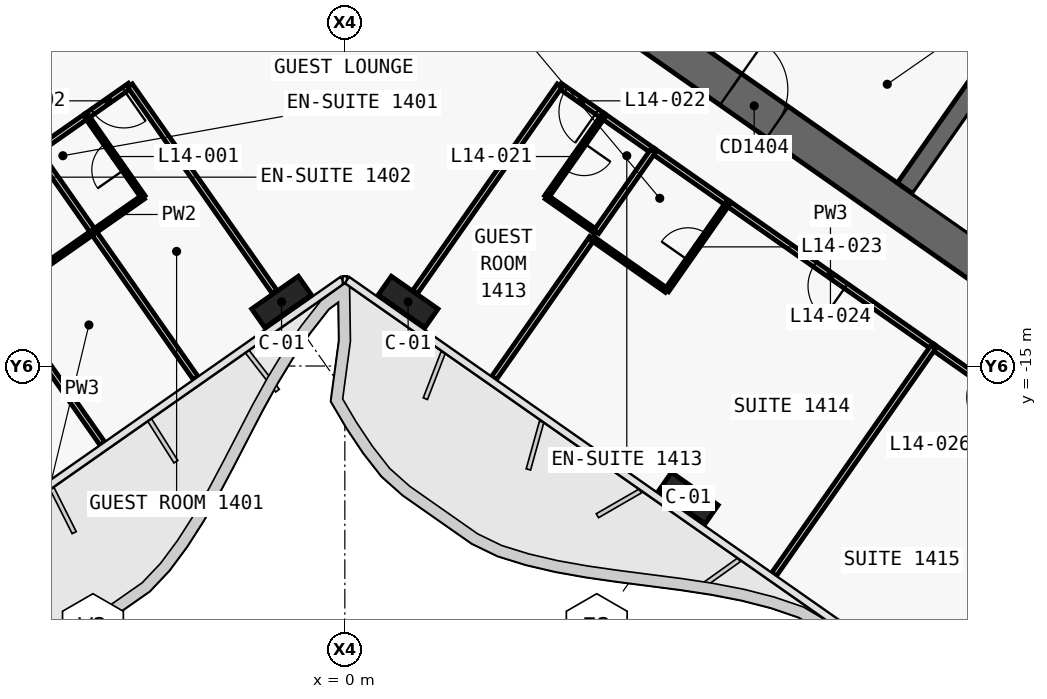
"""IFC4 building model, lengths in metres.
Left out: names, types, materials, properties, quantities, classifications, styles, units other than length and angle.
Written with IfcOpenShell. Run it as: python <this file> out.ifc"""

import sys

from ifc_helpers import new_model, si_unit, direction, frame, frame_2d, origin, origin_2d, place, context, subcontext, project, spatial, polyline, rectangle, outline, extrude, element, fill, save


model = new_model("IFC4")
c1 = context("Model", 3, precision=1e-05, world=origin(), true_north=direction((0.0, 1.0)))
c2 = subcontext(c1, "Body", "Model", "MODEL_VIEW")
j1 = project(units=[si_unit("LENGTHUNIT", "METRE"), si_unit("PLANEANGLEUNIT", "RADIAN")], contexts=[c1])
p1 = place(None, origin())
s1 = spatial("IfcSite", under=j1, at=p1, CompositionType="ELEMENT")
p2 = place(p1, origin())
s2 = spatial("IfcBuilding", under=s1, at=p2, CompositionType="ELEMENT")
p3 = place(p2, frame((0.0, 0.0, 76.1)))
s3 = spatial("IfcBuildingStorey", under=s2, at=p3, CompositionType="ELEMENT", Elevation=76.1)
p4 = place(p3, frame((0.037, 11.867, 0.0), z_axis=(0.0, 0.0, 1.0), x_axis=(-0.819155306259, -0.573571777746, 0.0)))
e1 = element("IfcWall", 1, at=p4, inside=s3, PredefinedType="SHEAR", context=c2, shape_type="SweptSolid", body=[
    extrude(outline(polyline([(33.837, 0.5), (0.7, 0.5), (0.0, -0.5), (33.837, -0.5), (33.837, 0.5)])), origin(), (0.0, 0.0, 1.0), 3.6),
])
p5 = place(p3, frame((0.037, -0.585, 0.0), z_axis=(0.0, 0.0, 1.0), x_axis=(-0.819157152511, -0.573569140985, 0.0)))
e2 = element("IfcWall", 2, at=p5, inside=s3, PredefinedType="SHEAR", context=c2, shape_type="SweptSolid", body=[
    extrude(outline(polyline([(26.695, 0.5), (0.7, 0.5), (0.0, -0.5), (26.695, -0.5), (26.695, 0.5)])), origin(), (0.0, 0.0, 1.0), 3.6),
])
p6 = place(p5, frame((2.995, 0.0, 0.0)))
e3 = element("IfcOpeningElement", 3, at=p6, cuts=e2, PredefinedType="OPENING", context=c2, shape_type="SweptSolid", body=[
    extrude(rectangle(XDim=2.4, YDim=2.1, at=frame_2d((1.2, 1.05))), frame((0.0, 0.51, 0.0), z_axis=(0.0, -1.0, 0.0), x_axis=(1.0, 0.0, 0.0)), (0.0, 0.0, 1.0), 1.02),
])
p7 = place(p5, frame((11.995, 0.0, 0.0)))
e4 = element("IfcOpeningElement", 4, at=p7, cuts=e2, PredefinedType="OPENING", context=c2, shape_type="SweptSolid", body=[
    extrude(rectangle(XDim=2.4, YDim=2.1, at=frame_2d((1.2, 1.05))), frame((0.0, 0.51, 0.0), z_axis=(0.0, -1.0, 0.0), x_axis=(1.0, 0.0, 0.0)), (0.0, 0.0, 1.0), 1.02),
])
p8 = place(p3, frame((-2.638, 3.768, 0.0), z_axis=(0.0, 0.0, 1.0), x_axis=(-0.819148977158, -0.573580816643, 0.0)))
e5 = element("IfcWall", 5, at=p8, inside=s3, PredefinedType="SHEAR", context=c2, shape_type="SweptSolid", body=[
    extrude(outline(polyline([(26.0, 0.25), (0.0, 0.25), (0.0, -0.25), (26.0, -0.25), (26.0, 0.25)])), origin(), (0.0, 0.0, 1.0), 3.6),
])
p9 = place(p8, frame((1.169, 0.0, 0.0)))
e6 = element("IfcOpeningElement", 6, at=p9, cuts=e5, PredefinedType="OPENING", context=c2, shape_type="SweptSolid", body=[
    extrude(rectangle(XDim=1.1, YDim=2.1, at=frame_2d((0.55, 1.05))), frame((0.0, 0.26, 0.0), z_axis=(0.0, -1.0, 0.0), x_axis=(1.0, 0.0, 0.0)), (0.0, 0.0, 1.0), 0.52),
])
p10 = place(p8, frame((3.206, 0.0, 0.0)))
e7 = element("IfcOpeningElement", 7, at=p10, cuts=e5, PredefinedType="OPENING", context=c2, shape_type="SweptSolid", body=[
    extrude(rectangle(XDim=1.1, YDim=2.1, at=frame_2d((0.55, 1.05))), frame((0.0, 0.26, 0.0), z_axis=(0.0, -1.0, 0.0), x_axis=(1.0, 0.0, 0.0)), (0.0, 0.0, 1.0), 0.52),
])
p11 = place(p8, frame((5.244, 0.0, 0.0)))
e8 = element("IfcOpeningElement", 8, at=p11, cuts=e5, PredefinedType="OPENING", context=c2, shape_type="SweptSolid", body=[
    extrude(rectangle(XDim=1.1, YDim=2.1, at=frame_2d((0.55, 1.05))), frame((0.0, 0.26, 0.0), z_axis=(0.0, -1.0, 0.0), x_axis=(1.0, 0.0, 0.0)), (0.0, 0.0, 1.0), 0.52),
])
p12 = place(p8, frame((7.281, 0.0, 0.0)))
e9 = element("IfcOpeningElement", 9, at=p12, cuts=e5, PredefinedType="OPENING", context=c2, shape_type="SweptSolid", body=[
    extrude(rectangle(XDim=1.1, YDim=2.1, at=frame_2d((0.55, 1.05))), frame((0.0, 0.26, 0.0), z_axis=(0.0, -1.0, 0.0), x_axis=(1.0, 0.0, 0.0)), (0.0, 0.0, 1.0), 0.52),
])
p13 = place(p8, frame((9.688, 0.0, 0.0)))
e10 = element("IfcOpeningElement", 10, at=p13, cuts=e5, PredefinedType="OPENING", context=c2, shape_type="SweptSolid", body=[
    extrude(rectangle(XDim=1.1, YDim=2.1, at=frame_2d((0.55, 1.05))), frame((0.0, 0.26, 0.0), z_axis=(0.0, -1.0, 0.0), x_axis=(1.0, 0.0, 0.0)), (0.0, 0.0, 1.0), 0.52),
])
p14 = place(p8, frame((11.863, 0.0, 0.0)))
e11 = element("IfcOpeningElement", 11, at=p14, cuts=e5, PredefinedType="OPENING", context=c2, shape_type="SweptSolid", body=[
    extrude(rectangle(XDim=1.1, YDim=2.1, at=frame_2d((0.55, 1.05))), frame((0.0, 0.26, 0.0), z_axis=(0.0, -1.0, 0.0), x_axis=(1.0, 0.0, 0.0)), (0.0, 0.0, 1.0), 0.52),
])
p15 = place(p8, frame((14.038, 0.0, 0.0)))
e12 = element("IfcOpeningElement", 12, at=p15, cuts=e5, PredefinedType="OPENING", context=c2, shape_type="SweptSolid", body=[
    extrude(rectangle(XDim=1.1, YDim=2.1, at=frame_2d((0.55, 1.05))), frame((0.0, 0.26, 0.0), z_axis=(0.0, -1.0, 0.0), x_axis=(1.0, 0.0, 0.0)), (0.0, 0.0, 1.0), 0.52),
])
p16 = place(p8, frame((16.212, 0.0, 0.0)))
e13 = element("IfcOpeningElement", 13, at=p16, cuts=e5, PredefinedType="OPENING", context=c2, shape_type="SweptSolid", body=[
    extrude(rectangle(XDim=1.1, YDim=2.1, at=frame_2d((0.55, 1.05))), frame((0.0, 0.26, 0.0), z_axis=(0.0, -1.0, 0.0), x_axis=(1.0, 0.0, 0.0)), (0.0, 0.0, 1.0), 0.52),
])
p17 = place(p3, frame((-0.037, 11.867, 0.0), z_axis=(0.0, 0.0, 1.0), x_axis=(0.819155306259, -0.573571777746, 0.0)))
e14 = element("IfcWall", 14, at=p17, inside=s3, PredefinedType="SHEAR", context=c2, shape_type="SweptSolid", body=[
    extrude(outline(polyline([(33.837, 0.5), (0.0, 0.5), (0.7, -0.5), (33.837, -0.5), (33.837, 0.5)])), origin(), (0.0, 0.0, 1.0), 3.6),
])
p18 = place(p3, frame((-0.037, -0.585, 0.0), z_axis=(0.0, 0.0, 1.0), x_axis=(0.819157152511, -0.573569140985, 0.0)))
e15 = element("IfcWall", 15, at=p18, inside=s3, PredefinedType="SHEAR", context=c2, shape_type="SweptSolid", body=[
    extrude(outline(polyline([(26.695, 0.5), (0.0, 0.5), (0.7, -0.5), (26.695, -0.5), (26.695, 0.5)])), origin(), (0.0, 0.0, 1.0), 3.6),
])
p19 = place(p18, frame((6.695, 0.0, 0.0)))
e16 = element("IfcOpeningElement", 16, at=p19, cuts=e15, PredefinedType="OPENING", context=c2, shape_type="SweptSolid", body=[
    extrude(rectangle(XDim=1.5, YDim=2.1, at=frame_2d((0.75, 1.05))), frame((0.0, 0.51, 0.0), z_axis=(0.0, -1.0, 0.0), x_axis=(1.0, 0.0, 0.0)), (0.0, 0.0, 1.0), 1.02),
])
p20 = place(p18, frame((12.445, 0.0, 0.0)))
e17 = element("IfcOpeningElement", 17, at=p20, cuts=e15, PredefinedType="OPENING", context=c2, shape_type="SweptSolid", body=[
    extrude(rectangle(XDim=1.5, YDim=2.1, at=frame_2d((0.75, 1.05))), frame((0.0, 0.51, 0.0), z_axis=(0.0, -1.0, 0.0), x_axis=(1.0, 0.0, 0.0)), (0.0, 0.0, 1.0), 1.02),
])
p21 = place(p3, frame((14.745, -10.324, 0.0), z_axis=(0.0, 0.0, 1.0), x_axis=(0.57356780395, 0.819158088694, 0.0)))
e18 = element("IfcWall", 18, at=p21, inside=s3, PredefinedType="SHEAR", context=c2, shape_type="SweptSolid", body=[
    extrude(outline(polyline([(0.0, 0.25), (0.0, -0.25), (4.35, -0.25), (4.35, 0.25), (0.0, 0.25)])), origin(), (0.0, 0.0, 1.0), 3.6),
])
p22 = place(p3, frame((2.638, 3.768, 0.0), z_axis=(0.0, 0.0, 1.0), x_axis=(0.819148977158, -0.573580816643, 0.0)))
e19 = element("IfcWall", 19, at=p22, inside=s3, PredefinedType="SHEAR", context=c2, shape_type="SweptSolid", body=[
    extrude(outline(polyline([(0.0, 0.25), (0.0, -0.25), (26.0, -0.25), (26.0, 0.25), (0.0, 0.25)])), origin(), (0.0, 0.0, 1.0), 3.6),
])
p23 = place(p22, frame((9.637, 0.0, 0.0)))
e20 = element("IfcOpeningElement", 20, at=p23, cuts=e19, PredefinedType="OPENING", context=c2, shape_type="SweptSolid", body=[
    extrude(rectangle(XDim=1.2, YDim=2.1, at=frame_2d((0.6, 1.05))), frame((0.0, 0.26, 0.0), z_axis=(0.0, -1.0, 0.0), x_axis=(1.0, 0.0, 0.0)), (0.0, 0.0, 1.0), 0.52),
])
p24 = place(p22, frame((11.812, 0.0, 0.0)))
e21 = element("IfcOpeningElement", 21, at=p24, cuts=e19, PredefinedType="OPENING", context=c2, shape_type="SweptSolid", body=[
    extrude(rectangle(XDim=1.2, YDim=2.1, at=frame_2d((0.6, 1.05))), frame((0.0, 0.26, 0.0), z_axis=(0.0, -1.0, 0.0), x_axis=(1.0, 0.0, 0.0)), (0.0, 0.0, 1.0), 0.52),
])
p25 = place(p22, frame((13.988, 0.0, 0.0)))
e22 = element("IfcOpeningElement", 22, at=p25, cuts=e19, PredefinedType="OPENING", context=c2, shape_type="SweptSolid", body=[
    extrude(rectangle(XDim=1.2, YDim=2.1, at=frame_2d((0.6, 1.05))), frame((0.0, 0.26, 0.0), z_axis=(0.0, -1.0, 0.0), x_axis=(1.0, 0.0, 0.0)), (0.0, 0.0, 1.0), 0.52),
])
p26 = place(p22, frame((16.262, 0.0, 0.0)))
e23 = element("IfcOpeningElement", 23, at=p26, cuts=e19, PredefinedType="OPENING", context=c2, shape_type="SweptSolid", body=[
    extrude(rectangle(XDim=1.0, YDim=2.1, at=frame_2d((0.5, 1.05))), frame((0.0, 0.26, 0.0), z_axis=(0.0, -1.0, 0.0), x_axis=(1.0, 0.0, 0.0)), (0.0, 0.0, 1.0), 0.52),
])
for number, where, z_axis, x_axis in (
    (24, (-1.665, -13.313, 0.0), (0.0, 0.0, 1.0), (-0.819, -0.574, 0.0)),
    (25, (1.665, -13.313, 0.0), (0.0, 0.0, 1.0), (0.819, -0.574, 0.0)),
    (26, (9.038, -18.475, 0.0), (0.0, 0.0, 1.0), (0.819, -0.574, 0.0)),
):
    element("IfcColumn", number, at=place(p3, frame(where, z_axis=z_axis, x_axis=x_axis)), inside=s3, PredefinedType="COLUMN", context=c2, shape_type="SweptSolid", body=[
        extrude(rectangle(XDim=1.5, YDim=0.6, at=origin_2d()), origin(), (0.0, 0.0, 1.0), 3.6),
    ])
p27 = place(p3, frame((6.799, -8.423, 0.0), z_axis=(0.0, 0.0, 1.0), x_axis=(-0.819207359301, 0.573497430219, 0.0)))
e27 = element("IfcWall", 27, at=p27, inside=s3, PredefinedType="PARTITIONING", context=c2, shape_type="SweptSolid", body=[
    extrude(rectangle(XDim=1.401, YDim=0.15, at=frame_2d((0.7, 0.0))), origin(), (0.0, 0.0, 1.0), 2.6),
])
p28 = place(p27, frame((0.201, 0.0, 0.0)))
e28 = element("IfcOpeningElement", 28, at=p28, cuts=e27, PredefinedType="OPENING", context=c2, shape_type="SweptSolid", body=[
    extrude(rectangle(XDim=1.0, YDim=2.1, at=frame_2d((0.5, 1.05))), frame((0.0, 0.085, 0.0), z_axis=(0.0, -1.0, 0.0), x_axis=(1.0, 0.0, 0.0)), (0.0, 0.0, 1.0), 0.17),
])
p29 = place(p3, frame((8.111, -9.342, 0.0), z_axis=(0.0, 0.0, 1.0), x_axis=(-0.8190674132, 0.573697283098, 0.0)))
e29 = element("IfcWall", 29, at=p29, inside=s3, PredefinedType="PARTITIONING", context=c2, shape_type="SweptSolid", body=[
    extrude(rectangle(XDim=1.604, YDim=0.15, at=frame_2d((0.802, 0.0))), origin(), (0.0, 0.0, 1.0), 3.32),
])
p30 = place(p3, frame((15.483, -14.504, 0.0), z_axis=(0.0, 0.0, 1.0), x_axis=(-0.819153746897, 0.573574004767, 0.0)))
e30 = element("IfcWall", 30, at=p30, inside=s3, PredefinedType="PARTITIONING", context=c2, shape_type="SweptSolid", body=[
    extrude(rectangle(XDim=6.603, YDim=0.15, at=frame_2d((3.302, 0.0))), origin(), (0.0, 0.0, 1.0), 2.6),
])
p31 = place(p30, frame((2.802, 0.0, 0.0)))
e31 = element("IfcOpeningElement", 31, at=p31, cuts=e30, PredefinedType="OPENING", context=c2, shape_type="SweptSolid", body=[
    extrude(rectangle(XDim=1.0, YDim=2.1, at=frame_2d((0.5, 1.05))), frame((0.0, 0.085, 0.0), z_axis=(0.0, -1.0, 0.0), x_axis=(1.0, 0.0, 0.0)), (0.0, 0.0, 1.0), 0.17),
])
p32 = place(p3, frame((10.077, -10.718, 0.0), z_axis=(0.0, 0.0, 1.0), x_axis=(-0.819146032251, 0.573585022335, 0.0)))
e32 = element("IfcWall", 32, at=p32, inside=s3, PredefinedType="PARTITIONING", context=c2, shape_type="SweptSolid", body=[
    extrude(rectangle(XDim=2.404, YDim=0.15, at=frame_2d((1.202, 0.0))), origin(), (0.0, 0.0, 1.0), 3.32),
])
p33 = place(p3, frame((18.431, -16.568, 0.0), z_axis=(0.0, 0.0, 1.0), x_axis=(-0.819145961204, 0.573585123798, 0.0)))
e33 = element("IfcWall", 33, at=p33, inside=s3, PredefinedType="PARTITIONING", context=c2, shape_type="SweptSolid", body=[
    extrude(rectangle(XDim=3.603, YDim=0.15, at=frame_2d((1.802, 0.0))), origin(), (0.0, 0.0, 1.0), 3.32),
])
p34 = place(p33, frame((1.301, 0.0, 0.0)))
e34 = element("IfcOpeningElement", 34, at=p34, cuts=e33, PredefinedType="OPENING", context=c2, shape_type="SweptSolid", body=[
    extrude(rectangle(XDim=1.0, YDim=2.1, at=frame_2d((0.5, 1.05))), frame((0.0, 0.085, 0.0), z_axis=(0.0, -1.0, 0.0), x_axis=(1.0, 0.0, 0.0)), (0.0, 0.0, 1.0), 0.17),
])
p35 = place(p3, frame((-5.652, -7.62, 0.0), z_axis=(0.0, 0.0, 1.0), x_axis=(-0.819207359301, -0.573497430219, 0.0)))
e35 = element("IfcWall", 35, at=p35, inside=s3, PredefinedType="PARTITIONING", context=c2, shape_type="SweptSolid", body=[
    extrude(rectangle(XDim=1.401, YDim=0.15, at=frame_2d((0.7, 0.0))), origin(), (0.0, 0.0, 1.0), 2.6),
])
p36 = place(p35, frame((0.2, 0.0, 0.0)))
e36 = element("IfcOpeningElement", 36, at=p36, cuts=e35, PredefinedType="OPENING", context=c2, shape_type="SweptSolid", body=[
    extrude(rectangle(XDim=1.0, YDim=2.1, at=frame_2d((0.5, 1.05))), frame((0.0, 0.085, 0.0), z_axis=(0.0, -1.0, 0.0), x_axis=(1.0, 0.0, 0.0)), (0.0, 0.0, 1.0), 0.17),
])
p37 = place(p3, frame((-6.797, -8.421, 0.0), z_axis=(0.0, 0.0, 1.0), x_axis=(-0.8190674132, -0.573697283098, 0.0)))
e37 = element("IfcWall", 37, at=p37, inside=s3, PredefinedType="PARTITIONING", context=c2, shape_type="SweptSolid", body=[
    extrude(rectangle(XDim=1.604, YDim=0.15, at=frame_2d((0.802, 0.0))), origin(), (0.0, 0.0, 1.0), 3.32),
])
p38 = place(p3, frame((6.798, -8.422, 0.0), z_axis=(0.0, 0.0, 1.0), x_axis=(-0.573537965655, -0.819178980414, 0.0)))
e38 = element("IfcWall", 38, at=p38, inside=s3, PredefinedType="PARTITIONING", context=c2, shape_type="SweptSolid", body=[
    extrude(rectangle(XDim=2.6, YDim=0.12, at=frame_2d((1.3, 0.0))), origin(), (0.0, 0.0, 1.0), 3.32),
])
p39 = place(p38, frame((0.875, 0.0, 0.0)))
e39 = element("IfcOpeningElement", 39, at=p39, cuts=e38, PredefinedType="OPENING", context=c2, shape_type="SweptSolid", body=[
    extrude(rectangle(XDim=0.85, YDim=2.05, at=frame_2d((0.425, 1.025))), frame((0.0, 0.07, 0.0), z_axis=(0.0, -1.0, 0.0), x_axis=(1.0, 0.0, 0.0)), (0.0, 0.0, 1.0), 0.14),
])
p40 = place(p3, frame((5.307, -10.553, 0.0), z_axis=(0.0, 0.0, 1.0), x_axis=(0.819131543282, -0.57360571371, 0.0)))
e40 = element("IfcWall", 40, at=p40, inside=s3, PredefinedType="PARTITIONING", context=c2, shape_type="SweptSolid", body=[
    extrude(rectangle(XDim=1.6, YDim=0.12, at=frame_2d((0.8, 0.0))), origin(), (0.0, 0.0, 1.0), 3.32),
])
p41 = place(p3, frame((6.504, -11.633, 0.0), z_axis=(0.0, 0.0, 1.0), x_axis=(-0.573556991349, -0.819165659482, 0.0)))
e41 = element("IfcWall", 41, at=p41, inside=s3, PredefinedType="PARTITIONING", context=c2, shape_type="SweptSolid", body=[
    extrude(rectangle(XDim=4.501, YDim=0.15, at=frame_2d((2.25, 0.0))), origin(), (0.0, 0.0, 1.0), 2.5),
])
p42 = place(p3, frame((1.849, -13.051, 0.0), z_axis=(0.0, 0.0, 1.0), x_axis=(0.57357355307, 0.819154063177, 0.0)))
e42 = element("IfcWall", 42, at=p42, inside=s3, PredefinedType="PARTITIONING", context=c2, shape_type="SweptSolid", body=[
    extrude(rectangle(XDim=6.63, YDim=0.15, at=frame_2d((3.315, 0.0))), origin(), (0.0, 0.0, 1.0), 2.6),
])
p43 = place(p3, frame((8.109, -9.34, 0.0), z_axis=(0.0, 0.0, 1.0), x_axis=(-0.573537965655, -0.819178980414, 0.0)))
e43 = element("IfcWall", 43, at=p43, inside=s3, PredefinedType="PARTITIONING", context=c2, shape_type="SweptSolid", body=[
    extrude(rectangle(XDim=2.6, YDim=0.15, at=frame_2d((1.3, 0.0))), origin(), (0.0, 0.0, 1.0), 3.32),
])
p44 = place(p3, frame((6.502, -11.635, 0.0), z_axis=(0.0, 0.0, 1.0), x_axis=(0.819141114317, -0.573592045652, 0.0)))
e44 = element("IfcWall", 44, at=p44, inside=s3, PredefinedType="PARTITIONING", context=c2, shape_type="SweptSolid", body=[
    extrude(rectangle(XDim=2.4, YDim=0.12, at=frame_2d((1.2, 0.0))), origin(), (0.0, 0.0, 1.0), 3.32),
])
p45 = place(p3, frame((8.47, -13.011, 0.0), z_axis=(0.0, 0.0, 1.0), x_axis=(0.573550118428, 0.819170471667, 0.0)))
e45 = element("IfcWall", 45, at=p45, inside=s3, PredefinedType="PARTITIONING", context=c2, shape_type="SweptSolid", body=[
    extrude(rectangle(XDim=2.8, YDim=0.12, at=frame_2d((1.4, 0.0))), origin(), (0.0, 0.0, 1.0), 3.32),
])
p46 = place(p45, frame((0.975, 0.0, 0.0)))
e46 = element("IfcOpeningElement", 46, at=p46, cuts=e45, PredefinedType="OPENING", context=c2, shape_type="SweptSolid", body=[
    extrude(rectangle(XDim=0.85, YDim=2.05, at=frame_2d((0.425, 1.025))), frame((0.0, 0.07, 0.0), z_axis=(0.0, -1.0, 0.0), x_axis=(1.0, 0.0, 0.0)), (0.0, 0.0, 1.0), 0.14),
])
p47 = place(p3, frame((15.481, -14.503, 0.0), z_axis=(0.0, 0.0, 1.0), x_axis=(-0.573572324301, -0.819154923562, 0.0)))
e47 = element("IfcWall", 47, at=p47, inside=s3, PredefinedType="PARTITIONING", context=c2, shape_type="SweptSolid", body=[
    extrude(rectangle(XDim=7.3, YDim=0.15, at=frame_2d((3.65, 0.0))), origin(), (0.0, 0.0, 1.0), 2.5),
])
p48 = place(p3, frame((-1.849, -13.051, 0.0), z_axis=(0.0, 0.0, 1.0), x_axis=(-0.573575988258, 0.819152358047, 0.0)))
e48 = element("IfcWall", 48, at=p48, inside=s3, PredefinedType="PARTITIONING", context=c2, shape_type="SweptSolid", body=[
    extrude(rectangle(XDim=6.632, YDim=0.15, at=frame_2d((3.316, 0.0))), origin(), (0.0, 0.0, 1.0), 2.6),
])
p49 = place(p3, frame((-6.617, -11.471, 0.0), z_axis=(0.0, 0.0, 1.0), x_axis=(0.819131543282, 0.57360571371, 0.0)))
e49 = element("IfcWall", 49, at=p49, inside=s3, PredefinedType="PARTITIONING", context=c2, shape_type="SweptSolid", body=[
    extrude(rectangle(XDim=1.6, YDim=0.12, at=frame_2d((0.8, 0.0))), origin(), (0.0, 0.0, 1.0), 3.32),
])
p50 = place(p3, frame((-5.306, -10.552, 0.0), z_axis=(0.0, 0.0, 1.0), x_axis=(-0.573537965655, 0.819178980414, 0.0)))
e50 = element("IfcWall", 50, at=p50, inside=s3, PredefinedType="PARTITIONING", context=c2, shape_type="SweptSolid", body=[
    extrude(rectangle(XDim=2.6, YDim=0.12, at=frame_2d((1.3, 0.0))), origin(), (0.0, 0.0, 1.0), 3.32),
])
p51 = place(p50, frame((0.875, 0.0, 0.0)))
e51 = element("IfcOpeningElement", 51, at=p51, cuts=e50, PredefinedType="OPENING", context=c2, shape_type="SweptSolid", body=[
    extrude(rectangle(XDim=0.85, YDim=2.05, at=frame_2d((0.425, 1.025))), frame((0.0, 0.07, 0.0), z_axis=(0.0, -1.0, 0.0), x_axis=(1.0, 0.0, 0.0)), (0.0, 0.0, 1.0), 0.14),
])
p52 = place(p3, frame((-3.922, -15.32, 0.0), z_axis=(0.0, 0.0, 1.0), x_axis=(-0.573535567792, 0.819180659243, 0.0)))
e52 = element("IfcWall", 52, at=p52, inside=s3, PredefinedType="PARTITIONING", context=c2, shape_type="SweptSolid", body=[
    extrude(rectangle(XDim=4.699, YDim=0.15, at=frame_2d((2.35, 0.0))), origin(), (0.0, 0.0, 1.0), 2.5),
])
p53 = place(p3, frame((-6.618, -11.47, 0.0), z_axis=(0.0, 0.0, 1.0), x_axis=(-0.573537965655, 0.819178980414, 0.0)))
e53 = element("IfcWall", 53, at=p53, inside=s3, PredefinedType="PARTITIONING", context=c2, shape_type="SweptSolid", body=[
    extrude(rectangle(XDim=2.6, YDim=0.15, at=frame_2d((1.3, 0.0))), origin(), (0.0, 0.0, 1.0), 3.32),
])
p54 = place(p3, frame((-7.928, -12.389, 0.0), z_axis=(0.0, 0.0, 1.0), x_axis=(0.81918174131, 0.573534022273, 0.0)))
e54 = element("IfcWall", 54, at=p54, inside=s3, PredefinedType="PARTITIONING", context=c2, shape_type="SweptSolid", body=[
    extrude(rectangle(XDim=1.6, YDim=0.12, at=frame_2d((0.8, 0.0))), origin(), (0.0, 0.0, 1.0), 3.32),
])
p55 = place(p3, frame((-6.379, -17.041, 0.0), z_axis=(0.0, 0.0, 1.0), x_axis=(-0.573579051994, 0.81915021279, 0.0)))
e55 = element("IfcWall", 55, at=p55, inside=s3, PredefinedType="PARTITIONING", context=c2, shape_type="SweptSolid", body=[
    extrude(rectangle(XDim=7.3, YDim=0.15, at=frame_2d((3.65, 0.0))), origin(), (0.0, 0.0, 1.0), 2.5),
])
p56 = place(p20, origin())
e56 = element("IfcDoor", 56, at=p56, inside=s3, OperationType="DOUBLE_DOOR_SINGLE_SWING", PredefinedType="DOOR", context=c2, shape_type="SweptSolid", body=[
    extrude(rectangle(XDim=1.5, YDim=2.1, at=frame_2d((0.75, 1.05))), frame((0.0, 0.025, 0.0), z_axis=(0.0, -1.0, 0.0), x_axis=(1.0, 0.0, 0.0)), (0.0, 0.0, 1.0), 0.05),
])
fill(e17, e56)
p57 = place(p51, origin())
e57 = element("IfcDoor", 57, at=p57, inside=s3, OperationType="SINGLE_SWING_RIGHT", PredefinedType="DOOR", context=c2, shape_type="SweptSolid", body=[
    extrude(rectangle(XDim=0.85, YDim=2.05, at=frame_2d((0.425, 1.025))), frame((0.0, 0.025, 0.0), z_axis=(0.0, -1.0, 0.0), x_axis=(1.0, 0.0, 0.0)), (0.0, 0.0, 1.0), 0.05),
])
fill(e51, e57)
p58 = place(p36, origin())
e58 = element("IfcDoor", 58, at=p58, inside=s3, OperationType="SINGLE_SWING_LEFT", PredefinedType="DOOR", context=c2, shape_type="SweptSolid", body=[
    extrude(rectangle(XDim=1.0, YDim=2.1, at=frame_2d((0.5, 1.05))), frame((0.0, 0.025, 0.0), z_axis=(0.0, -1.0, 0.0), x_axis=(1.0, 0.0, 0.0)), (0.0, 0.0, 1.0), 0.05),
])
fill(e36, e58)
p59 = place(p39, origin())
e59 = element("IfcDoor", 59, at=p59, inside=s3, OperationType="SINGLE_SWING_RIGHT", PredefinedType="DOOR", context=c2, shape_type="SweptSolid", body=[
    extrude(rectangle(XDim=0.85, YDim=2.05, at=frame_2d((0.425, 1.025))), frame((0.0, 0.025, 0.0), z_axis=(0.0, -1.0, 0.0), x_axis=(1.0, 0.0, 0.0)), (0.0, 0.0, 1.0), 0.05),
])
fill(e39, e59)
p60 = place(p28, origin())
e60 = element("IfcDoor", 60, at=p60, inside=s3, OperationType="SINGLE_SWING_LEFT", PredefinedType="DOOR", context=c2, shape_type="SweptSolid", body=[
    extrude(rectangle(XDim=1.0, YDim=2.1, at=frame_2d((0.5, 1.05))), frame((0.0, 0.025, 0.0), z_axis=(0.0, -1.0, 0.0), x_axis=(1.0, 0.0, 0.0)), (0.0, 0.0, 1.0), 0.05),
])
fill(e28, e60)
p61 = place(p46, origin())
e61 = element("IfcDoor", 61, at=p61, inside=s3, OperationType="SINGLE_SWING_LEFT", PredefinedType="DOOR", context=c2, shape_type="SweptSolid", body=[
    extrude(rectangle(XDim=0.85, YDim=2.05, at=frame_2d((0.425, 1.025))), frame((0.0, 0.025, 0.0), z_axis=(0.0, -1.0, 0.0), x_axis=(1.0, 0.0, 0.0)), (0.0, 0.0, 1.0), 0.05),
])
fill(e46, e61)
p62 = place(p31, origin())
e62 = element("IfcDoor", 62, at=p62, inside=s3, OperationType="SINGLE_SWING_LEFT", PredefinedType="DOOR", context=c2, shape_type="SweptSolid", body=[
    extrude(rectangle(XDim=1.0, YDim=2.1, at=frame_2d((0.5, 1.05))), frame((0.0, 0.025, 0.0), z_axis=(0.0, -1.0, 0.0), x_axis=(1.0, 0.0, 0.0)), (0.0, 0.0, 1.0), 0.05),
])
fill(e31, e62)
save(model, sys.argv[1])
